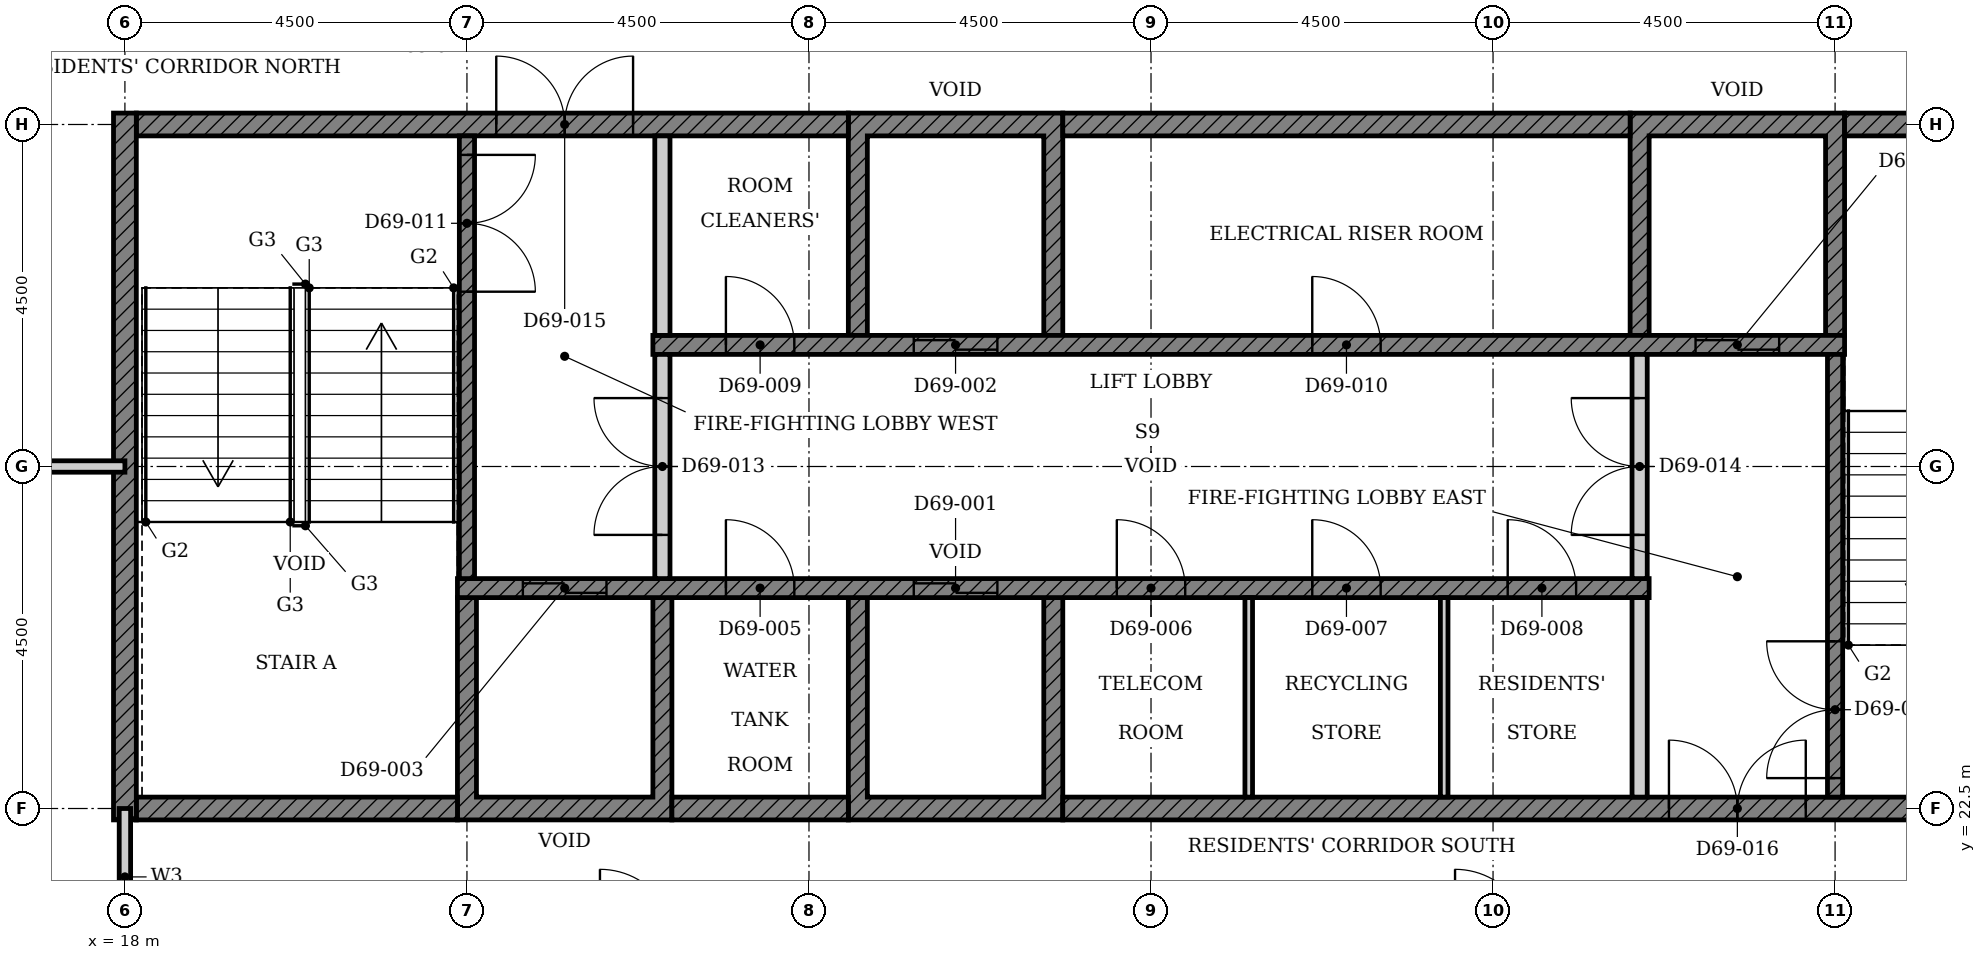
"""IFC4 building model, lengths in metres.
Left out: names, types, materials, properties, quantities, classifications, styles, units other than length and angle.
Written with IfcOpenShell. Run it as: python <this file> out.ifc"""

import sys

from ifc_helpers import new_model, si_unit, direction, frame, frame_2d, origin, place, context, subcontext, project, spatial, polyline, rectangle, outline, extrude, element, fill, save


model = new_model("IFC4")
c1 = context("Model", 3, precision=1e-05, world=origin(), true_north=direction((0.0, 1.0)))
c2 = subcontext(c1, "Body", "Model", "MODEL_VIEW")
j1 = project(units=[si_unit("LENGTHUNIT", "METRE"), si_unit("PLANEANGLEUNIT", "RADIAN")], contexts=[c1])
p1 = place(None, origin())
s1 = spatial("IfcSite", under=j1, at=p1, CompositionType="ELEMENT")
p2 = place(p1, origin())
s2 = spatial("IfcBuilding", under=s1, at=p2, CompositionType="ELEMENT")
p3 = place(p2, frame((0.0, 0.0, 271.2)))
s3 = spatial("IfcBuildingStorey", under=s2, at=p3, CompositionType="ELEMENT", Elevation=271.2)
p4 = place(p3, origin())
e1 = element("IfcWall", 1, at=p4, inside=s3, PredefinedType="SHEAR", context=c2, shape_type="SweptSolid", body=[
    extrude(outline(polyline([(22.375, 22.35), (25.197, 22.35), (25.197, 25.275), (24.947, 25.275), (24.947, 22.65), (22.625, 22.65), (22.625, 25.275), (22.375, 25.275), (22.375, 22.35)])), origin(), (0.0, 0.0, 1.0), 3.4),
])
p5 = place(p3, origin())
e2 = element("IfcWall", 2, at=p5, inside=s3, PredefinedType="SHEAR", context=c2, shape_type="SweptSolid", body=[
    extrude(outline(polyline([(27.518, 22.35), (30.339, 22.35), (30.339, 25.275), (30.089, 25.275), (30.089, 22.65), (27.768, 22.65), (27.768, 25.275), (27.518, 25.275), (27.518, 22.35)])), origin(), (0.0, 0.0, 1.0), 3.4),
])
p6 = place(p3, origin())
e3 = element("IfcWall", 3, at=p6, inside=s3, PredefinedType="SHEAR", context=c2, shape_type="SweptSolid", body=[
    extrude(outline(polyline([(27.518, 28.725), (27.768, 28.725), (27.768, 31.35), (30.089, 31.35), (30.089, 28.725), (30.339, 28.725), (30.339, 31.65), (27.518, 31.65), (27.518, 28.725)])), origin(), (0.0, 0.0, 1.0), 3.4),
])
p7 = place(p3, origin())
e4 = element("IfcWall", 4, at=p7, inside=s3, PredefinedType="SHEAR", context=c2, shape_type="SweptSolid", body=[
    extrude(outline(polyline([(37.803, 28.725), (38.053, 28.725), (38.053, 31.35), (40.375, 31.35), (40.375, 28.725), (40.625, 28.725), (40.625, 31.65), (37.803, 31.65), (37.803, 28.725)])), origin(), (0.0, 0.0, 1.0), 3.4),
])
p8 = place(p3, frame((18.15, 22.5, 0.0), z_axis=(0.0, 0.0, 1.0), x_axis=(1.0, 0.0, 0.0)))
e5 = element("IfcWall", 5, at=p8, inside=s3, PredefinedType="SHEAR", context=c2, shape_type="SweptSolid", body=[
    extrude(rectangle(XDim=4.225, YDim=0.3, at=frame_2d((2.113, 0.0))), origin(), (0.0, 0.0, 1.0), 3.4),
])
p9 = place(p3, frame((25.197, 22.5, 0.0), z_axis=(0.0, 0.0, 1.0), x_axis=(1.0, 0.0, 0.0)))
e6 = element("IfcWall", 6, at=p9, inside=s3, PredefinedType="SHEAR", context=c2, shape_type="SweptSolid", body=[
    extrude(rectangle(XDim=2.321, YDim=0.3, at=frame_2d((1.161, 0.0))), origin(), (0.0, 0.0, 1.0), 3.4),
])
p10 = place(p3, frame((30.339, 22.5, 0.0), z_axis=(0.0, 0.0, 1.0), x_axis=(1.0, 0.0, 0.0)))
e7 = element("IfcWall", 7, at=p10, inside=s3, PredefinedType="SHEAR", context=c2, shape_type="SweptSolid", body=[
    extrude(rectangle(XDim=14.511, YDim=0.3, at=frame_2d((7.255, 0.0))), origin(), (0.0, 0.0, 1.0), 3.4),
])
p11 = place(p10, frame((7.975, 0.0, 0.0)))
e8 = element("IfcOpeningElement", 8, at=p11, cuts=e7, PredefinedType="OPENING", context=c2, shape_type="SweptSolid", body=[
    extrude(rectangle(XDim=1.8, YDim=2.1, at=frame_2d((0.9, 1.05))), frame((0.0, 0.16, 0.0), z_axis=(0.0, -1.0, 0.0), x_axis=(1.0, 0.0, 0.0)), (0.0, 0.0, 1.0), 0.32),
])
p12 = place(p3, frame((18.15, 31.5, 0.0), z_axis=(0.0, 0.0, 1.0), x_axis=(1.0, 0.0, 0.0)))
e9 = element("IfcWall", 9, at=p12, inside=s3, PredefinedType="SHEAR", context=c2, shape_type="SweptSolid", body=[
    extrude(rectangle(XDim=9.368, YDim=0.3, at=frame_2d((4.684, 0.0))), origin(), (0.0, 0.0, 1.0), 3.4),
])
p13 = place(p12, frame((4.736, 0.0, 0.0)))
e10 = element("IfcOpeningElement", 10, at=p13, cuts=e9, PredefinedType="OPENING", context=c2, shape_type="SweptSolid", body=[
    extrude(rectangle(XDim=1.8, YDim=2.1, at=frame_2d((0.9, 1.05))), frame((0.0, 0.16, 0.0), z_axis=(0.0, -1.0, 0.0), x_axis=(1.0, 0.0, 0.0)), (0.0, 0.0, 1.0), 0.32),
])
p14 = place(p3, frame((30.339, 31.5, 0.0), z_axis=(0.0, 0.0, 1.0), x_axis=(1.0, 0.0, 0.0)))
e11 = element("IfcWall", 11, at=p14, inside=s3, PredefinedType="SHEAR", context=c2, shape_type="SweptSolid", body=[
    extrude(rectangle(XDim=7.464, YDim=0.3, at=frame_2d((3.732, 0.0))), origin(), (0.0, 0.0, 1.0), 3.4),
])
p15 = place(p3, frame((40.625, 31.5, 0.0), z_axis=(0.0, 0.0, 1.0), x_axis=(1.0, 0.0, 0.0)))
e12 = element("IfcWall", 12, at=p15, inside=s3, PredefinedType="SHEAR", context=c2, shape_type="SweptSolid", body=[
    extrude(rectangle(XDim=4.225, YDim=0.3, at=frame_2d((2.113, 0.0))), origin(), (0.0, 0.0, 1.0), 3.4),
])
p16 = place(p3, frame((18.0, 22.35, 0.0), z_axis=(0.0, 0.0, 1.0), x_axis=(0.0, 1.0, 0.0)))
e13 = element("IfcWall", 13, at=p16, inside=s3, PredefinedType="SHEAR", context=c2, shape_type="SweptSolid", body=[
    extrude(rectangle(XDim=9.3, YDim=0.3, at=frame_2d((4.65, 0.0))), origin(), (0.0, 0.0, 1.0), 3.4),
])
p17 = place(p3, frame((22.375, 25.4, 0.0), z_axis=(0.0, 0.0, 1.0), x_axis=(1.0, 0.0, 0.0)))
e14 = element("IfcWall", 14, at=p17, inside=s3, PredefinedType="SHEAR", context=c2, shape_type="SweptSolid", body=[
    extrude(rectangle(XDim=15.678, YDim=0.25, at=frame_2d((7.839, 0.0))), origin(), (0.0, 0.0, 1.0), 3.4),
])
p18 = place(p17, frame((6.004, 0.0, 0.0)))
e15 = element("IfcOpeningElement", 15, at=p18, cuts=e14, PredefinedType="OPENING", context=c2, shape_type="SweptSolid", body=[
    extrude(rectangle(XDim=1.1, YDim=2.1, at=frame_2d((0.55, 1.05))), frame((0.0, 0.135, 0.0), z_axis=(0.0, -1.0, 0.0), x_axis=(1.0, 0.0, 0.0)), (0.0, 0.0, 1.0), 0.27),
])
p19 = place(p17, frame((0.861, 0.0, 0.0)))
e16 = element("IfcOpeningElement", 16, at=p19, cuts=e14, PredefinedType="OPENING", context=c2, shape_type="SweptSolid", body=[
    extrude(rectangle(XDim=1.1, YDim=2.1, at=frame_2d((0.55, 1.05))), frame((0.0, 0.135, 0.0), z_axis=(0.0, -1.0, 0.0), x_axis=(1.0, 0.0, 0.0)), (0.0, 0.0, 1.0), 0.27),
])
p20 = place(p17, frame((3.532, 0.0, 0.0)))
e17 = element("IfcOpeningElement", 17, at=p20, cuts=e14, PredefinedType="OPENING", context=c2, shape_type="SweptSolid", body=[
    extrude(rectangle(XDim=0.9, YDim=2.1, at=frame_2d((0.45, 1.05))), frame((0.0, 0.135, 0.0), z_axis=(0.0, -1.0, 0.0), x_axis=(1.0, 0.0, 0.0)), (0.0, 0.0, 1.0), 0.27),
])
p21 = place(p17, frame((8.675, 0.0, 0.0)))
e18 = element("IfcOpeningElement", 18, at=p21, cuts=e14, PredefinedType="OPENING", context=c2, shape_type="SweptSolid", body=[
    extrude(rectangle(XDim=0.9, YDim=2.1, at=frame_2d((0.45, 1.05))), frame((0.0, 0.135, 0.0), z_axis=(0.0, -1.0, 0.0), x_axis=(1.0, 0.0, 0.0)), (0.0, 0.0, 1.0), 0.27),
])
p22 = place(p17, frame((11.246, 0.0, 0.0)))
e19 = element("IfcOpeningElement", 19, at=p22, cuts=e14, PredefinedType="OPENING", context=c2, shape_type="SweptSolid", body=[
    extrude(rectangle(XDim=0.9, YDim=2.1, at=frame_2d((0.45, 1.05))), frame((0.0, 0.135, 0.0), z_axis=(0.0, -1.0, 0.0), x_axis=(1.0, 0.0, 0.0)), (0.0, 0.0, 1.0), 0.27),
])
p23 = place(p17, frame((13.818, 0.0, 0.0)))
e20 = element("IfcOpeningElement", 20, at=p23, cuts=e14, PredefinedType="OPENING", context=c2, shape_type="SweptSolid", body=[
    extrude(rectangle(XDim=0.9, YDim=2.1, at=frame_2d((0.45, 1.05))), frame((0.0, 0.135, 0.0), z_axis=(0.0, -1.0, 0.0), x_axis=(1.0, 0.0, 0.0)), (0.0, 0.0, 1.0), 0.27),
])
p24 = place(p3, frame((24.947, 28.6, 0.0), z_axis=(0.0, 0.0, 1.0), x_axis=(1.0, 0.0, 0.0)))
e21 = element("IfcWall", 21, at=p24, inside=s3, PredefinedType="SHEAR", context=c2, shape_type="SweptSolid", body=[
    extrude(rectangle(XDim=15.678, YDim=0.25, at=frame_2d((7.839, 0.0))), origin(), (0.0, 0.0, 1.0), 3.4),
])
p25 = place(p24, frame((3.432, 0.0, 0.0)))
e22 = element("IfcOpeningElement", 22, at=p25, cuts=e21, PredefinedType="OPENING", context=c2, shape_type="SweptSolid", body=[
    extrude(rectangle(XDim=1.1, YDim=2.1, at=frame_2d((0.55, 1.05))), frame((0.0, 0.135, 0.0), z_axis=(0.0, -1.0, 0.0), x_axis=(1.0, 0.0, 0.0)), (0.0, 0.0, 1.0), 0.27),
])
p26 = place(p24, frame((13.718, 0.0, 0.0)))
e23 = element("IfcOpeningElement", 23, at=p26, cuts=e21, PredefinedType="OPENING", context=c2, shape_type="SweptSolid", body=[
    extrude(rectangle(XDim=1.1, YDim=2.1, at=frame_2d((0.55, 1.05))), frame((0.0, 0.135, 0.0), z_axis=(0.0, -1.0, 0.0), x_axis=(1.0, 0.0, 0.0)), (0.0, 0.0, 1.0), 0.27),
])
p27 = place(p24, frame((0.961, 0.0, 0.0)))
e24 = element("IfcOpeningElement", 24, at=p27, cuts=e21, PredefinedType="OPENING", context=c2, shape_type="SweptSolid", body=[
    extrude(rectangle(XDim=0.9, YDim=2.1, at=frame_2d((0.45, 1.05))), frame((0.0, 0.135, 0.0), z_axis=(0.0, -1.0, 0.0), x_axis=(1.0, 0.0, 0.0)), (0.0, 0.0, 1.0), 0.27),
])
p28 = place(p24, frame((8.675, 0.0, 0.0)))
e25 = element("IfcOpeningElement", 25, at=p28, cuts=e21, PredefinedType="OPENING", context=c2, shape_type="SweptSolid", body=[
    extrude(rectangle(XDim=0.9, YDim=2.1, at=frame_2d((0.45, 1.05))), frame((0.0, 0.135, 0.0), z_axis=(0.0, -1.0, 0.0), x_axis=(1.0, 0.0, 0.0)), (0.0, 0.0, 1.0), 0.27),
])
p29 = place(p3, frame((37.928, 22.65, 0.0), z_axis=(0.0, 0.0, 1.0), x_axis=(0.0, 1.0, 0.0)))
e26 = element("IfcWall", 26, at=p29, inside=s3, PredefinedType="PARTITIONING", context=c2, shape_type="SweptSolid", body=[
    extrude(rectangle(XDim=2.625, YDim=0.2, at=frame_2d((1.312, 0.0))), origin(), (0.0, 0.0, 1.0), 3.4),
])
for number, where, z_axis, x_axis in (
    (27, (32.786, 22.65, 0.0), (0.0, 0.0, 1.0), (0.0, 1.0, 0.0)),
    (28, (35.357, 22.65, 0.0), (0.0, 0.0, 1.0), (0.0, 1.0, 0.0)),
):
    element("IfcWall", number, at=place(p3, frame(where, z_axis=z_axis, x_axis=x_axis)), inside=s3, PredefinedType="PARTITIONING", context=c2, shape_type="SweptSolid", body=[
        extrude(rectangle(XDim=2.625, YDim=0.1, at=frame_2d((1.312, 0.0))), origin(), (0.0, 0.0, 1.0), 3.4),
    ])
p30 = place(p3, frame((25.072, 28.725, 0.0), z_axis=(0.0, 0.0, 1.0), x_axis=(0.0, 1.0, 0.0)))
e29 = element("IfcWall", 29, at=p30, inside=s3, PredefinedType="PARTITIONING", context=c2, shape_type="SweptSolid", body=[
    extrude(rectangle(XDim=2.625, YDim=0.2, at=frame_2d((1.312, 0.0))), origin(), (0.0, 0.0, 1.0), 3.4),
])
p31 = place(p3, frame((22.5, 31.35, 0.0), z_axis=(0.0, 0.0, 1.0), x_axis=(0.0, -1.0, 0.0)))
e30 = element("IfcWall", 30, at=p31, inside=s3, PredefinedType="SHEAR", context=c2, shape_type="SweptSolid", body=[
    extrude(rectangle(XDim=5.825, YDim=0.2, at=frame_2d((2.913, 0.0))), origin(), (0.0, 0.0, 1.0), 3.4),
])
p32 = place(p31, frame((0.25, 0.0, 0.0)))
e31 = element("IfcOpeningElement", 31, at=p32, cuts=e30, PredefinedType="OPENING", context=c2, shape_type="SweptSolid", body=[
    extrude(rectangle(XDim=1.8, YDim=2.1, at=frame_2d((0.9, 1.05))), frame((0.0, 0.11, 0.0), z_axis=(0.0, -1.0, 0.0), x_axis=(1.0, 0.0, 0.0)), (0.0, 0.0, 1.0), 0.22),
])
p33 = place(p3, frame((40.5, 22.65, 0.0), z_axis=(0.0, 0.0, 1.0), x_axis=(0.0, 1.0, 0.0)))
e32 = element("IfcWall", 32, at=p33, inside=s3, PredefinedType="SHEAR", context=c2, shape_type="SweptSolid", body=[
    extrude(rectangle(XDim=5.825, YDim=0.2, at=frame_2d((2.913, 0.0))), origin(), (0.0, 0.0, 1.0), 3.4),
])
p34 = place(p33, frame((0.25, 0.0, 0.0)))
e33 = element("IfcOpeningElement", 33, at=p34, cuts=e32, PredefinedType="OPENING", context=c2, shape_type="SweptSolid", body=[
    extrude(rectangle(XDim=1.8, YDim=2.1, at=frame_2d((0.9, 1.05))), frame((0.0, 0.11, 0.0), z_axis=(0.0, -1.0, 0.0), x_axis=(1.0, 0.0, 0.0)), (0.0, 0.0, 1.0), 0.22),
])
p35 = place(p3, frame((25.072, 25.525, 0.0), z_axis=(0.0, 0.0, 1.0), x_axis=(0.0, 1.0, 0.0)))
e34 = element("IfcWall", 34, at=p35, inside=s3, PredefinedType="PARTITIONING", context=c2, shape_type="SweptSolid", body=[
    extrude(rectangle(XDim=2.95, YDim=0.2, at=frame_2d((1.475, 0.0))), origin(), (0.0, 0.0, 1.0), 3.4),
])
p36 = place(p35, frame((0.575, 0.0, 0.0)))
e35 = element("IfcOpeningElement", 35, at=p36, cuts=e34, PredefinedType="OPENING", context=c2, shape_type="SweptSolid", body=[
    extrude(rectangle(XDim=1.8, YDim=2.1, at=frame_2d((0.9, 1.05))), frame((0.0, 0.11, 0.0), z_axis=(0.0, -1.0, 0.0), x_axis=(1.0, 0.0, 0.0)), (0.0, 0.0, 1.0), 0.22),
])
p37 = place(p3, frame((37.928, 25.525, 0.0), z_axis=(0.0, 0.0, 1.0), x_axis=(0.0, 1.0, 0.0)))
e36 = element("IfcWall", 36, at=p37, inside=s3, PredefinedType="PARTITIONING", context=c2, shape_type="SweptSolid", body=[
    extrude(rectangle(XDim=2.95, YDim=0.2, at=frame_2d((1.475, 0.0))), origin(), (0.0, 0.0, 1.0), 3.4),
])
p38 = place(p37, frame((0.575, 0.0, 0.0)))
e37 = element("IfcOpeningElement", 37, at=p38, cuts=e36, PredefinedType="OPENING", context=c2, shape_type="SweptSolid", body=[
    extrude(rectangle(XDim=1.8, YDim=2.1, at=frame_2d((0.9, 1.05))), frame((0.0, 0.11, 0.0), z_axis=(0.0, -1.0, 0.0), x_axis=(1.0, 0.0, 0.0)), (0.0, 0.0, 1.0), 0.22),
])
p39 = place(p3, frame((4.5, 27.0, 0.0), z_axis=(0.0, 0.0, 1.0), x_axis=(1.0, 0.0, 0.0)))
e38 = element("IfcWall", 38, at=p39, inside=s3, PredefinedType="PARTITIONING", context=c2, shape_type="SweptSolid", body=[
    extrude(rectangle(XDim=13.5, YDim=0.15, at=frame_2d((6.75, 0.0))), origin(), (0.0, 0.0, 1.0), 2.68),
])
p40 = place(p39, frame((5.35, 0.0, 0.0)))
e39 = element("IfcOpeningElement", 39, at=p40, cuts=e38, PredefinedType="OPENING", context=c2, shape_type="SweptSolid", body=[
    extrude(rectangle(XDim=1.0, YDim=2.1, at=frame_2d((0.5, 1.05))), frame((0.0, 0.085, 0.0), z_axis=(0.0, -1.0, 0.0), x_axis=(1.0, 0.0, 0.0)), (0.0, 0.0, 1.0), 0.17),
])
p41 = place(p3, frame((18.0, 20.7, 0.0), z_axis=(0.0, 0.0, 1.0), x_axis=(0.0, 1.0, 0.0)))
e40 = element("IfcWall", 40, at=p41, inside=s3, PredefinedType="PARTITIONING", context=c2, shape_type="SweptSolid", body=[
    extrude(rectangle(XDim=1.8, YDim=0.15, at=frame_2d((0.9, 0.0))), origin(), (0.0, 0.0, 1.0), 3.4),
])
p42 = place(p18, origin())
e41 = element("IfcDoor", 41, at=p42, inside=s3, OperationType="DOUBLE_DOOR_SLIDING", PredefinedType="DOOR", context=c2, shape_type="SweptSolid", body=[
    extrude(rectangle(XDim=1.1, YDim=2.1, at=frame_2d((0.55, 1.05))), frame((0.0, 0.025, 0.0), z_axis=(0.0, -1.0, 0.0), x_axis=(1.0, 0.0, 0.0)), (0.0, 0.0, 1.0), 0.05),
])
fill(e15, e41)
p43 = place(p25, origin())
e42 = element("IfcDoor", 42, at=p43, inside=s3, OperationType="DOUBLE_DOOR_SLIDING", PredefinedType="DOOR", context=c2, shape_type="SweptSolid", body=[
    extrude(rectangle(XDim=1.1, YDim=2.1, at=frame_2d((0.55, 1.05))), frame((0.0, 0.025, 0.0), z_axis=(0.0, -1.0, 0.0), x_axis=(1.0, 0.0, 0.0)), (0.0, 0.0, 1.0), 0.05),
])
fill(e22, e42)
p44 = place(p19, origin())
e43 = element("IfcDoor", 43, at=p44, inside=s3, OperationType="DOUBLE_DOOR_SLIDING", PredefinedType="DOOR", context=c2, shape_type="SweptSolid", body=[
    extrude(rectangle(XDim=1.1, YDim=2.1, at=frame_2d((0.55, 1.05))), frame((0.0, 0.025, 0.0), z_axis=(0.0, -1.0, 0.0), x_axis=(1.0, 0.0, 0.0)), (0.0, 0.0, 1.0), 0.05),
])
fill(e16, e43)
p45 = place(p26, origin())
e44 = element("IfcDoor", 44, at=p45, inside=s3, OperationType="DOUBLE_DOOR_SLIDING", PredefinedType="DOOR", context=c2, shape_type="SweptSolid", body=[
    extrude(rectangle(XDim=1.1, YDim=2.1, at=frame_2d((0.55, 1.05))), frame((0.0, 0.025, 0.0), z_axis=(0.0, -1.0, 0.0), x_axis=(1.0, 0.0, 0.0)), (0.0, 0.0, 1.0), 0.05),
])
fill(e23, e44)
p46 = place(p20, origin())
e45 = element("IfcDoor", 45, at=p46, inside=s3, OperationType="SINGLE_SWING_LEFT", PredefinedType="DOOR", context=c2, shape_type="SweptSolid", body=[
    extrude(rectangle(XDim=0.9, YDim=2.1, at=frame_2d((0.45, 1.05))), frame((0.0, 0.025, 0.0), z_axis=(0.0, -1.0, 0.0), x_axis=(1.0, 0.0, 0.0)), (0.0, 0.0, 1.0), 0.05),
])
fill(e17, e45)
p47 = place(p21, origin())
e46 = element("IfcDoor", 46, at=p47, inside=s3, OperationType="SINGLE_SWING_LEFT", PredefinedType="DOOR", context=c2, shape_type="SweptSolid", body=[
    extrude(rectangle(XDim=0.9, YDim=2.1, at=frame_2d((0.45, 1.05))), frame((0.0, 0.025, 0.0), z_axis=(0.0, -1.0, 0.0), x_axis=(1.0, 0.0, 0.0)), (0.0, 0.0, 1.0), 0.05),
])
fill(e18, e46)
p48 = place(p22, origin())
e47 = element("IfcDoor", 47, at=p48, inside=s3, OperationType="SINGLE_SWING_LEFT", PredefinedType="DOOR", context=c2, shape_type="SweptSolid", body=[
    extrude(rectangle(XDim=0.9, YDim=2.1, at=frame_2d((0.45, 1.05))), frame((0.0, 0.025, 0.0), z_axis=(0.0, -1.0, 0.0), x_axis=(1.0, 0.0, 0.0)), (0.0, 0.0, 1.0), 0.05),
])
fill(e19, e47)
p49 = place(p23, origin())
e48 = element("IfcDoor", 48, at=p49, inside=s3, OperationType="SINGLE_SWING_LEFT", PredefinedType="DOOR", context=c2, shape_type="SweptSolid", body=[
    extrude(rectangle(XDim=0.9, YDim=2.1, at=frame_2d((0.45, 1.05))), frame((0.0, 0.025, 0.0), z_axis=(0.0, -1.0, 0.0), x_axis=(1.0, 0.0, 0.0)), (0.0, 0.0, 1.0), 0.05),
])
fill(e20, e48)
p50 = place(p27, origin())
e49 = element("IfcDoor", 49, at=p50, inside=s3, OperationType="SINGLE_SWING_LEFT", PredefinedType="DOOR", context=c2, shape_type="SweptSolid", body=[
    extrude(rectangle(XDim=0.9, YDim=2.1, at=frame_2d((0.45, 1.05))), frame((0.0, 0.025, 0.0), z_axis=(0.0, -1.0, 0.0), x_axis=(1.0, 0.0, 0.0)), (0.0, 0.0, 1.0), 0.05),
])
fill(e24, e49)
p51 = place(p28, origin())
e50 = element("IfcDoor", 50, at=p51, inside=s3, OperationType="SINGLE_SWING_LEFT", PredefinedType="DOOR", context=c2, shape_type="SweptSolid", body=[
    extrude(rectangle(XDim=0.9, YDim=2.1, at=frame_2d((0.45, 1.05))), frame((0.0, 0.025, 0.0), z_axis=(0.0, -1.0, 0.0), x_axis=(1.0, 0.0, 0.0)), (0.0, 0.0, 1.0), 0.05),
])
fill(e25, e50)
p52 = place(p32, origin())
e51 = element("IfcDoor", 51, at=p52, inside=s3, OperationType="DOUBLE_DOOR_SINGLE_SWING", PredefinedType="DOOR", context=c2, shape_type="SweptSolid", body=[
    extrude(rectangle(XDim=1.8, YDim=2.1, at=frame_2d((0.9, 1.05))), frame((0.0, 0.025, 0.0), z_axis=(0.0, -1.0, 0.0), x_axis=(1.0, 0.0, 0.0)), (0.0, 0.0, 1.0), 0.05),
])
fill(e31, e51)
p53 = place(p34, origin())
e52 = element("IfcDoor", 52, at=p53, inside=s3, OperationType="DOUBLE_DOOR_SINGLE_SWING", PredefinedType="DOOR", context=c2, shape_type="SweptSolid", body=[
    extrude(rectangle(XDim=1.8, YDim=2.1, at=frame_2d((0.9, 1.05))), frame((0.0, 0.025, 0.0), z_axis=(0.0, -1.0, 0.0), x_axis=(1.0, 0.0, 0.0)), (0.0, 0.0, 1.0), 0.05),
])
fill(e33, e52)
p54 = place(p36, origin())
e53 = element("IfcDoor", 53, at=p54, inside=s3, OperationType="DOUBLE_DOOR_SINGLE_SWING", PredefinedType="DOOR", context=c2, shape_type="SweptSolid", body=[
    extrude(rectangle(XDim=1.8, YDim=2.1, at=frame_2d((0.9, 1.05))), frame((0.0, 0.025, 0.0), z_axis=(0.0, -1.0, 0.0), x_axis=(1.0, 0.0, 0.0)), (0.0, 0.0, 1.0), 0.05),
])
fill(e35, e53)
p55 = place(p38, origin())
e54 = element("IfcDoor", 54, at=p55, inside=s3, OperationType="DOUBLE_DOOR_SINGLE_SWING", PredefinedType="DOOR", context=c2, shape_type="SweptSolid", body=[
    extrude(rectangle(XDim=1.8, YDim=2.1, at=frame_2d((0.9, 1.05))), frame((0.0, 0.025, 0.0), z_axis=(0.0, -1.0, 0.0), x_axis=(1.0, 0.0, 0.0)), (0.0, 0.0, 1.0), 0.05),
])
fill(e37, e54)
p56 = place(p13, origin())
e55 = element("IfcDoor", 55, at=p56, inside=s3, OperationType="DOUBLE_DOOR_SINGLE_SWING", PredefinedType="DOOR", context=c2, shape_type="SweptSolid", body=[
    extrude(rectangle(XDim=1.8, YDim=2.1, at=frame_2d((0.9, 1.05))), frame((0.0, 0.025, 0.0), z_axis=(0.0, -1.0, 0.0), x_axis=(1.0, 0.0, 0.0)), (0.0, 0.0, 1.0), 0.05),
])
fill(e10, e55)
p57 = place(p11, origin())
e56 = element("IfcDoor", 56, at=p57, inside=s3, OperationType="DOUBLE_DOOR_SINGLE_SWING", PredefinedType="DOOR", context=c2, shape_type="SweptSolid", body=[
    extrude(rectangle(XDim=1.8, YDim=2.1, at=frame_2d((0.9, 1.05))), frame((0.0, 0.025, 0.0), z_axis=(0.0, -1.0, 0.0), x_axis=(1.0, 0.0, 0.0)), (0.0, 0.0, 1.0), 0.05),
])
fill(e8, e56)
save(model, sys.argv[1])
